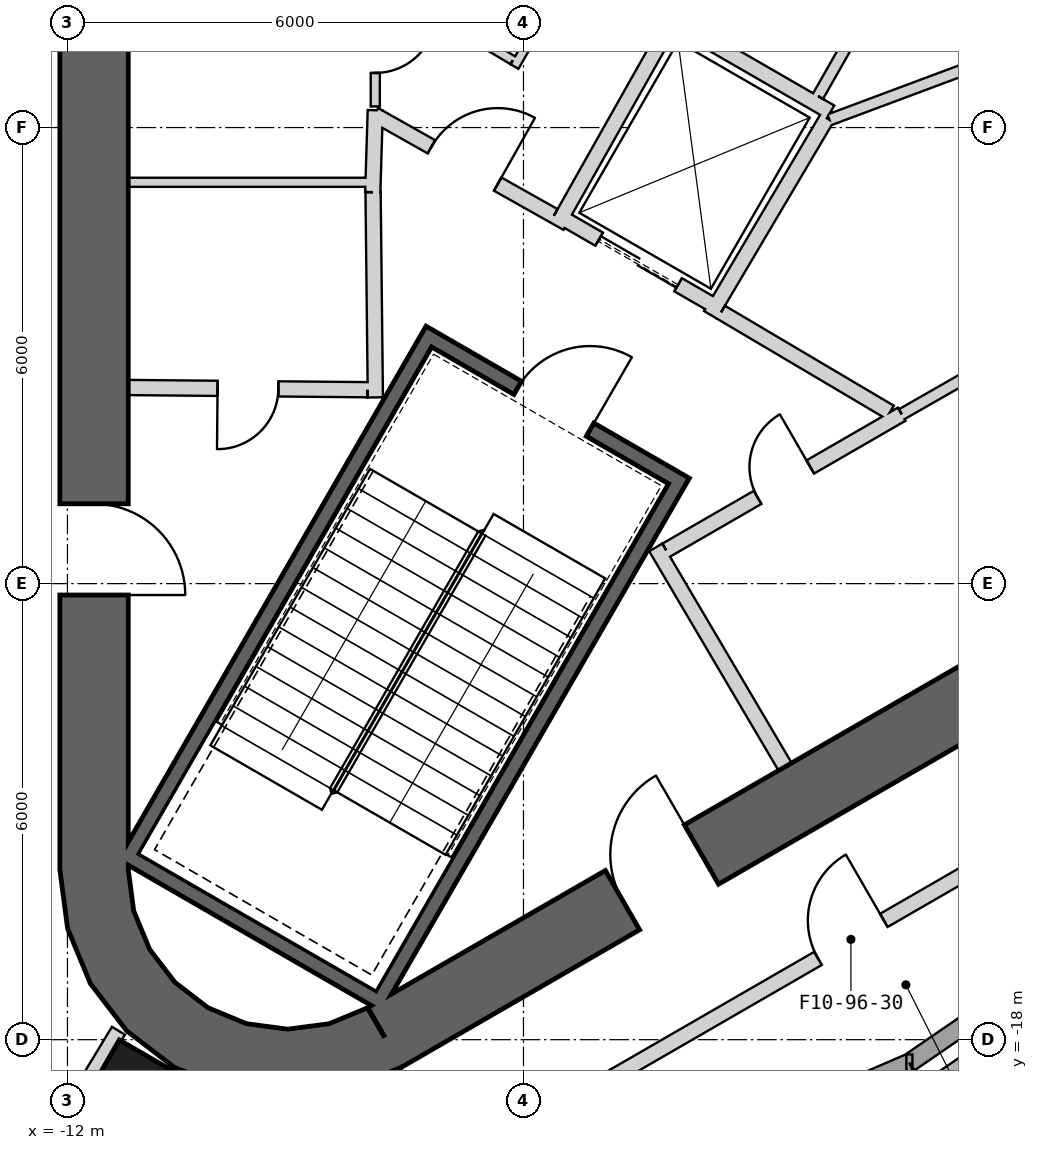
"""IFC4 building model, lengths in metres.
Left out: names, types, materials, properties, quantities, classifications, styles, units other than length and angle.
Written with IfcOpenShell. Run it as: python <this file> out.ifc"""

import sys

from ifc_helpers import new_model, si_unit, direction, frame, frame_2d, origin, origin_2d, place, context, subcontext, project, spatial, polyline, rectangle, outline, extrude, element, fill, save


model = new_model("IFC4")
c1 = context("Model", 3, precision=1e-05, world=origin(), true_north=direction((0.0, 1.0)))
c2 = subcontext(c1, "Body", "Model", "MODEL_VIEW")
j1 = project(units=[si_unit("LENGTHUNIT", "METRE"), si_unit("PLANEANGLEUNIT", "RADIAN")], contexts=[c1])
p1 = place(None, origin())
s1 = spatial("IfcSite", under=j1, at=p1, CompositionType="ELEMENT")
p2 = place(p1, origin())
s2 = spatial("IfcBuilding", under=s1, at=p2, CompositionType="ELEMENT")
p3 = place(p2, frame((0.0, 0.0, 425.3)))
s3 = spatial("IfcBuildingStorey", under=s2, at=p3, CompositionType="ELEMENT", Elevation=425.3)
p4 = place(p3, frame((-11.025, -19.097, -0.25), z_axis=(0.0, 0.0, 1.0), x_axis=(-0.5, -0.866025403784, 0.0)))
e1 = element("IfcColumn", 1, at=p4, inside=s3, PredefinedType="COLUMN", context=c2, shape_type="SweptSolid", body=[
    extrude(rectangle(XDim=1.6, YDim=1.6, at=origin_2d()), origin(), (0.0, 0.0, 1.0), 5.25),
])
p5 = place(p3, frame((-11.65, 15.762, 0.0), z_axis=(0.0, 0.0, 1.0), x_axis=(0.0, -1.0, 0.0)))
e2 = element("IfcWall", 2, at=p5, inside=s3, PredefinedType="SHEAR", context=c2, shape_type="SweptSolid", body=[
    extrude(rectangle(XDim=31.523, YDim=0.9, at=frame_2d((15.762, 0.0))), origin(), (0.0, 0.0, 1.0), 5.0),
])
p6 = place(p5, frame((3.612, 0.0, 0.0)))
e3 = element("IfcOpeningElement", 3, at=p6, cuts=e2, PredefinedType="OPENING", context=c2, shape_type="SweptSolid", body=[
    extrude(rectangle(XDim=1.2, YDim=2.4, at=frame_2d((0.6, 1.2))), frame((0.0, 0.46, 0.0), z_axis=(0.0, -1.0, 0.0), x_axis=(1.0, 0.0, 0.0)), (0.0, 0.0, 1.0), 0.92),
])
p7 = place(p5, frame((26.712, 0.0, 0.0)))
e4 = element("IfcOpeningElement", 4, at=p7, cuts=e2, PredefinedType="OPENING", context=c2, shape_type="SweptSolid", body=[
    extrude(rectangle(XDim=1.2, YDim=2.4, at=frame_2d((0.6, 1.2))), frame((0.0, 0.46, 0.0), z_axis=(0.0, -1.0, 0.0), x_axis=(1.0, 0.0, 0.0)), (0.0, 0.0, 1.0), 0.92),
])
p8 = place(p3, frame((-7.825, -17.97, 0.0), z_axis=(0.0, 0.0, 1.0), x_axis=(0.866028369851, 0.499994862586, 0.0)))
e5 = element("IfcWall", 5, at=p8, inside=s3, PredefinedType="SHEAR", context=c2, shape_type="SweptSolid", body=[
    extrude(rectangle(XDim=31.523, YDim=0.9, at=frame_2d((15.762, 0.0))), origin(), (0.0, 0.0, 1.0), 5.0),
])
p9 = place(p8, frame((17.862, 0.0, 0.0)))
e6 = element("IfcOpeningElement", 6, at=p9, cuts=e5, PredefinedType="OPENING", context=c2, shape_type="SweptSolid", body=[
    extrude(rectangle(XDim=1.2, YDim=2.4, at=frame_2d((0.6, 1.2))), frame((0.0, 0.46, 0.0), z_axis=(0.0, -1.0, 0.0), x_axis=(1.0, 0.0, 0.0)), (0.0, 0.0, 1.0), 0.92),
])
p10 = place(p8, frame((20.562, 0.0, 0.0)))
e7 = element("IfcOpeningElement", 7, at=p10, cuts=e5, PredefinedType="OPENING", context=c2, shape_type="SweptSolid", body=[
    extrude(rectangle(XDim=1.2, YDim=2.4, at=frame_2d((0.6, 1.2))), frame((0.0, 0.46, 0.0), z_axis=(0.0, -1.0, 0.0), x_axis=(1.0, 0.0, 0.0)), (0.0, 0.0, 1.0), 0.92),
])
p11 = place(p8, frame((26.712, 0.0, 0.0)))
e8 = element("IfcOpeningElement", 8, at=p11, cuts=e5, PredefinedType="OPENING", context=c2, shape_type="SweptSolid", body=[
    extrude(rectangle(XDim=1.2, YDim=2.4, at=frame_2d((0.6, 1.2))), frame((0.0, 0.46, 0.0), z_axis=(0.0, -1.0, 0.0), x_axis=(1.0, 0.0, 0.0)), (0.0, 0.0, 1.0), 0.92),
])
p12 = place(p8, frame((3.612, 0.0, 0.0)))
e9 = element("IfcOpeningElement", 9, at=p12, cuts=e5, PredefinedType="OPENING", context=c2, shape_type="SweptSolid", body=[
    extrude(rectangle(XDim=1.2, YDim=2.4, at=frame_2d((0.6, 1.2))), frame((0.0, 0.46, 0.0), z_axis=(0.0, -1.0, 0.0), x_axis=(1.0, 0.0, 0.0)), (0.0, 0.0, 1.0), 0.92),
])
p13 = place(p3, origin())
e10 = element("IfcWall", 10, at=p13, inside=s3, PredefinedType="SHEAR", context=c2, shape_type="SweptSolid", body=[
    extrude(outline(polyline([(-12.1, -15.762), (-11.998, -16.538), (-11.698, -17.262), (-11.221, -17.883), (-10.6, -18.36), (-9.876, -18.659), (-9.1, -18.762), (-8.323, -18.659), (-7.6, -18.36), (-8.05, -17.58), (-8.556, -17.79), (-9.1, -17.862), (-9.644, -17.79), (-10.15, -17.58), (-10.585, -17.247), (-10.919, -16.812), (-11.128, -16.305), (-11.2, -15.762), (-12.1, -15.762)])), origin(), (0.0, 0.0, 1.0), 5.0),
])
p14 = place(p3, frame((-14.612, -16.579, 0.0), z_axis=(0.0, 0.0, 1.0), x_axis=(0.499577110492, -0.866269421527, 0.0)))
e11 = element("IfcWall", 11, at=p14, inside=s3, PredefinedType="SOLIDWALL", context=c2, shape_type="SweptSolid", body=[
    extrude(rectangle(XDim=5.041, YDim=0.24, at=frame_2d((2.521, 0.0))), origin(), (0.0, 0.0, 1.0), 4.75),
])
p15 = place(p3, frame((-7.038, -20.94, 0.0), z_axis=(0.0, 0.0, 1.0), x_axis=(0.918295366669, 0.395895970621, 0.0)))
e12 = element("IfcWall", 12, at=p15, inside=s3, PredefinedType="SOLIDWALL", context=c2, shape_type="SweptSolid", body=[
    extrude(rectangle(XDim=6.66, YDim=0.24, at=frame_2d((3.33, 0.0))), origin(), (0.0, 0.0, 1.0), 4.75),
])
p16 = place(p3, frame((-0.922, -18.304, 0.0), z_axis=(0.0, 0.0, 1.0), x_axis=(0.824481583442, 0.565888786393, 0.0)))
e13 = element("IfcWall", 13, at=p16, inside=s3, PredefinedType="SOLIDWALL", context=c2, shape_type="SweptSolid", body=[
    extrude(rectangle(XDim=19.966, YDim=0.24, at=frame_2d((9.983, 0.0))), origin(), (0.0, 0.0, 1.0), 4.75),
])
p17 = place(p3, frame((16.933, -7.402, 0.04), z_axis=(0.0, 0.0, 1.0), x_axis=(-0.824479303652, -0.565892107958, 0.0)))
e14 = element("IfcWall", 14, at=p17, inside=s3, PredefinedType="PARAPET", context=c2, shape_type="SweptSolid", body=[
    extrude(rectangle(XDim=21.975, YDim=0.25, at=frame_2d((10.987, 0.0))), origin(), (0.0, 0.0, 1.0), 1.2),
])
p18 = place(p3, frame((16.181, -7.25, 0.04), z_axis=(0.0, 0.0, 1.0), x_axis=(-0.824481781464, -0.56588849788, 0.0)))
e15 = element("IfcWall", 15, at=p18, inside=s3, PredefinedType="PARAPET", context=c2, shape_type="SweptSolid", body=[
    extrude(rectangle(XDim=20.799, YDim=0.5, at=frame_2d((10.399, 0.0))), origin(), (0.0, 0.0, 1.0), 0.6),
])
p19 = place(p3, frame((-3.905, -10.563, -0.25), z_axis=(0.0, 0.0, 1.0), x_axis=(-0.500012932018, -0.866017937352, 0.0)))
e16 = element("IfcWall", 16, at=p19, inside=s3, PredefinedType="SHEAR", context=c2, shape_type="SweptSolid", body=[
    extrude(rectangle(XDim=8.1, YDim=0.2, at=frame_2d((4.05, 0.0))), origin(), (0.0, 0.0, 1.0), 5.0),
])
p20 = place(p3, frame((-11.282, -15.541, -0.25), z_axis=(0.0, 0.0, 1.0), x_axis=(0.866000483506, -0.500043160704, 0.0)))
e17 = element("IfcWall", 17, at=p20, inside=s3, PredefinedType="SHEAR", context=c2, shape_type="SweptSolid", body=[
    extrude(rectangle(XDim=3.8, YDim=0.2, at=frame_2d((1.9, 0.0))), origin(), (0.0, 0.0, 1.0), 5.0),
])
p21 = place(p3, frame((-7.196, -8.663, -0.25), z_axis=(0.0, 0.0, 1.0), x_axis=(-0.499997992926, -0.866026562566, 0.0)))
e18 = element("IfcWall", 18, at=p21, inside=s3, PredefinedType="SHEAR", context=c2, shape_type="SweptSolid", body=[
    extrude(rectangle(XDim=7.9, YDim=0.2, at=frame_2d((3.95, 0.0))), origin(), (0.0, 0.0, 1.0), 5.0),
])
p22 = place(p3, frame((-4.041, -10.599, -0.25), z_axis=(0.0, 0.0, 1.0), x_axis=(-0.866047807691, 0.499961193289, 0.0)))
e19 = element("IfcWall", 19, at=p22, inside=s3, PredefinedType="SHEAR", context=c2, shape_type="SweptSolid", body=[
    extrude(rectangle(XDim=3.6, YDim=0.2, at=frame_2d((1.8, 0.0))), origin(), (0.0, 0.0, 1.0), 5.0),
])
p23 = place(p22, frame((1.25, 0.0, 0.25)))
e20 = element("IfcOpeningElement", 20, at=p23, cuts=e19, PredefinedType="OPENING", context=c2, shape_type="SweptSolid", body=[
    extrude(rectangle(XDim=1.1, YDim=2.1, at=frame_2d((0.55, 1.05))), frame((0.0, 0.11, 0.0), z_axis=(0.0, -1.0, 0.0), x_axis=(1.0, 0.0, 0.0)), (0.0, 0.0, 1.0), 0.22),
])
p24 = place(p3, frame((-3.446, -8.368, 0.0), z_axis=(0.0, 0.0, 1.0), x_axis=(-0.866024647952, 0.500001309137, 0.0)))
e21 = element("IfcWall", 21, at=p24, inside=s3, PredefinedType="PLUMBINGWALL", context=c2, shape_type="SweptSolid", body=[
    extrude(rectangle(XDim=2.4, YDim=0.2, at=frame_2d((1.2, 0.0))), origin(), (0.0, 0.0, 1.0), 4.75),
])
p25 = place(p24, frame((0.6, 0.0, 0.0)))
e22 = element("IfcOpeningElement", 22, at=p25, cuts=e21, PredefinedType="OPENING", context=c2, shape_type="SweptSolid", body=[
    extrude(rectangle(XDim=1.2, YDim=2.4, at=frame_2d((0.6, 1.2))), frame((0.0, 0.11, 0.0), z_axis=(0.0, -1.0, 0.0), x_axis=(1.0, 0.0, 0.0)), (0.0, 0.0, 1.0), 0.22),
])
p26 = place(p3, frame((-3.953, -4.646, 0.0), z_axis=(0.0, 0.0, 1.0), x_axis=(0.866053019151, -0.499952165731, 0.0)))
e23 = element("IfcWall", 23, at=p26, inside=s3, PredefinedType="PLUMBINGWALL", context=c2, shape_type="SweptSolid", body=[
    extrude(rectangle(XDim=2.3, YDim=0.2, at=frame_2d((1.15, 0.0))), origin(), (0.0, 0.0, 1.0), 4.75),
])
p27 = place(p3, frame((-2.008, -5.878, 0.0), z_axis=(0.0, 0.0, 1.0), x_axis=(-0.508893526607, -0.860829471253, 0.0)))
e24 = element("IfcWall", 24, at=p27, inside=s3, PredefinedType="PLUMBINGWALL", context=c2, shape_type="SweptSolid", body=[
    extrude(rectangle(XDim=3.005, YDim=0.2, at=frame_2d((1.502, 0.0))), origin(), (0.0, 0.0, 1.0), 4.75),
])
p28 = place(p3, frame((-3.99, -4.509, 0.0), z_axis=(0.0, 0.0, 1.0), x_axis=(-0.491358283181, -0.870957540612, 0.0)))
e25 = element("IfcWall", 25, at=p28, inside=s3, PredefinedType="PLUMBINGWALL", context=c2, shape_type="SweptSolid", body=[
    extrude(rectangle(XDim=3.2, YDim=0.2, at=frame_2d((1.6, 0.0))), origin(), (0.0, 0.0, 1.0), 4.75),
])
p29 = place(p3, frame((-7.95, -5.722, 0.0), z_axis=(0.0, 0.0, 1.0), x_axis=(0.0, 1.0, 0.0)))
e26 = element("IfcWall", 26, at=p29, inside=s3, PredefinedType="PARTITIONING", context=c2, shape_type="SweptSolid", body=[
    extrude(rectangle(XDim=1.702, YDim=0.12, at=frame_2d((0.851, 0.0))), origin(), (0.0, 0.0, 1.0), 4.75),
])
p30 = place(p29, frame((0.441, 0.0, 0.0)))
e27 = element("IfcOpeningElement", 27, at=p30, cuts=e26, PredefinedType="OPENING", context=c2, shape_type="SweptSolid", body=[
    extrude(rectangle(XDim=0.8, YDim=2.1, at=frame_2d((0.4, 1.05))), frame((0.0, 0.07, 0.0), z_axis=(0.0, -1.0, 0.0), x_axis=(1.0, 0.0, 0.0)), (0.0, 0.0, 1.0), 0.14),
])
p31 = place(p3, frame((-11.2, -6.72, 0.0), z_axis=(0.0, 0.0, 1.0), x_axis=(1.0, 0.0, 0.0)))
e28 = element("IfcWall", 28, at=p31, inside=s3, PredefinedType="PARTITIONING", context=c2, shape_type="SweptSolid", body=[
    extrude(rectangle(XDim=3.25, YDim=0.12, at=frame_2d((1.625, 0.0))), origin(), (0.0, 0.0, 1.0), 4.75),
])
p32 = place(p3, frame((-7.983, -6.85, 0.0), z_axis=(0.0, 0.0, 1.0), x_axis=(0.030803413295, 0.999525462272, 0.0)))
e29 = element("IfcWall", 29, at=p32, inside=s3, PredefinedType="PARTITIONING", context=c2, shape_type="SweptSolid", body=[
    extrude(rectangle(XDim=1.078, YDim=0.2, at=frame_2d((0.539, 0.0))), origin(), (0.0, 0.0, 1.0), 4.75),
])
p33 = place(p3, frame((-7.949, -9.55, 0.0), z_axis=(0.0, 0.0, 1.0), x_axis=(-0.011121475088, 0.999938154483, 0.0)))
e30 = element("IfcWall", 30, at=p33, inside=s3, PredefinedType="PARTITIONING", context=c2, shape_type="SweptSolid", body=[
    extrude(rectangle(XDim=2.7, YDim=0.2, at=frame_2d((1.35, 0.0))), origin(), (0.0, 0.0, 1.0), 4.75),
])
p34 = place(p3, frame((-11.2, -9.42, 0.0), z_axis=(0.0, 0.0, 1.0), x_axis=(0.999957467379, -0.009222983926, 0.0)))
e31 = element("IfcWall", 31, at=p34, inside=s3, PredefinedType="PARTITIONING", context=c2, shape_type="SweptSolid", body=[
    extrude(rectangle(XDim=3.15, YDim=0.2, at=frame_2d((1.575, 0.0))), origin(), (0.0, 0.0, 1.0), 4.75),
])
p35 = place(p34, frame((1.175, 0.0, 0.0)))
e32 = element("IfcOpeningElement", 32, at=p35, cuts=e31, PredefinedType="OPENING", context=c2, shape_type="SweptSolid", body=[
    extrude(rectangle(XDim=0.8, YDim=2.1, at=frame_2d((0.4, 1.05))), frame((0.0, 0.11, 0.0), z_axis=(0.0, -1.0, 0.0), x_axis=(1.0, 0.0, 0.0)), (0.0, 0.0, 1.0), 0.22),
])
p36 = place(p3, frame((-4.26, -11.524, 0.0), z_axis=(0.0, 0.0, 1.0), x_axis=(0.507997497166, -0.861358544901, 0.0)))
e33 = element("IfcWall", 33, at=p36, inside=s3, PredefinedType="PARTITIONING", context=c2, shape_type="SweptSolid", body=[
    extrude(rectangle(XDim=3.35, YDim=0.2, at=frame_2d((1.675, 0.0))), origin(), (0.0, 0.0, 1.0), 4.75),
])
p37 = place(p3, frame((-1.024, -9.771, 0.0), z_axis=(0.0, 0.0, 1.0), x_axis=(-0.866029903013, -0.499992207027, 0.0)))
e34 = element("IfcWall", 34, at=p37, inside=s3, PredefinedType="PARTITIONING", context=c2, shape_type="SweptSolid", body=[
    extrude(rectangle(XDim=3.578, YDim=0.2, at=frame_2d((1.789, 0.0))), origin(), (0.0, 0.0, 1.0), 4.75),
])
p38 = place(p37, frame((1.389, 0.0, 0.0)))
e35 = element("IfcOpeningElement", 35, at=p38, cuts=e34, PredefinedType="OPENING", context=c2, shape_type="SweptSolid", body=[
    extrude(rectangle(XDim=0.8, YDim=2.1, at=frame_2d((0.4, 1.05))), frame((0.0, 0.11, 0.0), z_axis=(0.0, -1.0, 0.0), x_axis=(1.0, 0.0, 0.0)), (0.0, 0.0, 1.0), 0.22),
])
p39 = place(p3, frame((-1.024, -9.771, 0.0), z_axis=(0.0, 0.0, 1.0), x_axis=(0.868110220015, 0.496371479746, 0.0)))
e36 = element("IfcWall", 36, at=p39, inside=s3, PredefinedType="PLUMBINGWALL", context=c2, shape_type="SweptSolid", body=[
    extrude(rectangle(XDim=7.123, YDim=0.15, at=frame_2d((3.561, 0.0))), origin(), (0.0, 0.0, 1.0), 4.75),
])
p40 = place(p3, frame((-3.401, -8.43, 0.0), z_axis=(0.0, 0.0, 1.0), x_axis=(0.860630814782, -0.509229418482, 0.0)))
e37 = element("IfcWall", 37, at=p40, inside=s3, PredefinedType="PARTITIONING", context=c2, shape_type="SweptSolid", body=[
    extrude(rectangle(XDim=2.582, YDim=0.2, at=frame_2d((1.291, 0.0))), origin(), (0.0, 0.0, 1.0), 4.75),
])
p41 = place(p3, frame((-7.961, -5.831, 0.0), z_axis=(0.0, 0.0, 1.0), x_axis=(0.871337173459, -0.490684756385, 0.0)))
e38 = element("IfcWall", 38, at=p41, inside=s3, PredefinedType="PARTITIONING", context=c2, shape_type="SweptSolid", body=[
    extrude(rectangle(XDim=2.709, YDim=0.2, at=frame_2d((1.354, 0.0))), origin(), (0.0, 0.0, 1.0), 4.75),
])
p42 = place(p41, frame((0.861, 0.0, 0.0)))
e39 = element("IfcOpeningElement", 39, at=p42, cuts=e38, PredefinedType="OPENING", context=c2, shape_type="SweptSolid", body=[
    extrude(rectangle(XDim=1.0, YDim=2.1, at=frame_2d((0.5, 1.05))), frame((0.0, 0.11, 0.0), z_axis=(0.0, -1.0, 0.0), x_axis=(1.0, 0.0, 0.0)), (0.0, 0.0, 1.0), 0.22),
])
p43 = place(p3, frame((6.729, -2.65, 0.0), z_axis=(0.0, 0.0, 1.0), x_axis=(-0.936914282609, -0.349559189613, 0.0)))
e40 = element("IfcWall", 40, at=p43, inside=s3, PredefinedType="PLUMBINGWALL", context=c2, shape_type="SweptSolid", body=[
    extrude(rectangle(XDim=9.291, YDim=0.15, at=frame_2d((4.645, 0.0))), origin(), (0.0, 0.0, 1.0), 4.75),
])
p44 = place(p3, frame((0.02, -1.814, 0.0), z_axis=(0.0, 0.0, 1.0), x_axis=(-0.494047106341, -0.869435136578, 0.0)))
e41 = element("IfcWall", 41, at=p44, inside=s3, PredefinedType="PLUMBINGWALL", context=c2, shape_type="SweptSolid", body=[
    extrude(rectangle(XDim=4.339, YDim=0.15, at=frame_2d((2.17, 0.0))), origin(), (0.0, 0.0, 1.0), 4.75),
])
p45 = place(p44, frame((1.833, 0.0, 0.0)))
e42 = element("IfcOpeningElement", 42, at=p45, cuts=e41, PredefinedType="OPENING", context=c2, shape_type="SweptSolid", body=[
    extrude(rectangle(XDim=0.8, YDim=2.1, at=frame_2d((0.4, 1.05))), frame((0.0, 0.085, 0.0), z_axis=(0.0, -1.0, 0.0), x_axis=(1.0, 0.0, 0.0)), (0.0, 0.0, 1.0), 0.17),
])
p46 = place(p3, frame((-6.118, -5.197, 0.0), z_axis=(0.0, 0.0, 1.0), x_axis=(0.499990139034, 0.866031096941, 0.0)))
e43 = element("IfcWall", 43, at=p46, inside=s3, PredefinedType="PARTITIONING", context=c2, shape_type="SweptSolid", body=[
    extrude(rectangle(XDim=3.0, YDim=0.12, at=frame_2d((1.5, 0.0))), origin(), (0.0, 0.0, 1.0), 4.75),
])
p47 = place(p3, frame((-7.89, -4.077, 0.0), z_axis=(0.0, 0.0, 1.0), x_axis=(0.860118010064, -0.510095097765, 0.0)))
e44 = element("IfcWall", 44, at=p47, inside=s3, PredefinedType="PARTITIONING", context=c2, shape_type="SweptSolid", body=[
    extrude(rectangle(XDim=2.035, YDim=0.12, at=frame_2d((1.017, 0.0))), origin(), (0.0, 0.0, 1.0), 4.75),
])
p48 = place(p3, frame((-12.104, -19.161, 0.0), z_axis=(0.0, 0.0, 1.0), x_axis=(0.518475368733, 0.855092563421, 0.0)))
e45 = element("IfcWall", 45, at=p48, inside=s3, PredefinedType="PARTITIONING", context=c2, shape_type="SweptSolid", body=[
    extrude(rectangle(XDim=1.496, YDim=0.2, at=frame_2d((0.748, 0.0))), origin(), (0.0, 0.0, 1.0), 4.75),
])
p49 = place(p3, frame((-7.234, -19.881, 0.0), z_axis=(0.0, 0.0, 1.0), x_axis=(0.866028703517, 0.499994284652, 0.0)))
e46 = element("IfcWall", 46, at=p49, inside=s3, PredefinedType="PARTITIONING", context=c2, shape_type="SweptSolid", body=[
    extrude(rectangle(XDim=12.75, YDim=0.2, at=frame_2d((6.375, 0.0))), origin(), (0.0, 0.0, 1.0), 4.75),
])
p50 = place(p49, frame((5.9, 0.0, 0.0)))
e47 = element("IfcOpeningElement", 47, at=p50, cuts=e46, PredefinedType="OPENING", context=c2, shape_type="SweptSolid", body=[
    extrude(rectangle(XDim=1.0, YDim=2.1, at=frame_2d((0.5, 1.05))), frame((0.0, 0.11, 0.0), z_axis=(0.0, -1.0, 0.0), x_axis=(1.0, 0.0, 0.0)), (0.0, 0.0, 1.0), 0.22),
])
p51 = place(p23, origin())
e48 = element("IfcDoor", 48, at=p51, inside=s3, OperationType="SINGLE_SWING_LEFT", PredefinedType="USERDEFINED", context=c2, shape_type="SweptSolid", body=[
    extrude(rectangle(XDim=1.1, YDim=2.1, at=frame_2d((0.55, 1.05))), frame((0.0, 0.025, 0.0), z_axis=(0.0, -1.0, 0.0), x_axis=(1.0, 0.0, 0.0)), (0.0, 0.0, 1.0), 0.05),
])
fill(e20, e48)
p52 = place(p42, origin())
e49 = element("IfcDoor", 49, at=p52, inside=s3, OperationType="SINGLE_SWING_RIGHT", PredefinedType="USERDEFINED", context=c2, shape_type="SweptSolid", body=[
    extrude(rectangle(XDim=1.0, YDim=2.1, at=frame_2d((0.5, 1.05))), frame((0.0, 0.025, 0.0), z_axis=(0.0, -1.0, 0.0), x_axis=(1.0, 0.0, 0.0)), (0.0, 0.0, 1.0), 0.05),
])
fill(e39, e49)
p53 = place(p25, origin())
e50 = element("IfcDoor", 50, at=p53, inside=s3, OperationType="SLIDING_TO_LEFT", PredefinedType="USERDEFINED", context=c2, shape_type="SweptSolid", body=[
    extrude(rectangle(XDim=1.2, YDim=2.4, at=frame_2d((0.6, 1.2))), frame((0.0, 0.025, 0.0), z_axis=(0.0, -1.0, 0.0), x_axis=(1.0, 0.0, 0.0)), (0.0, 0.0, 1.0), 0.05),
])
fill(e22, e50)
p54 = place(p30, origin())
e51 = element("IfcDoor", 51, at=p54, inside=s3, OperationType="SINGLE_SWING_RIGHT", PredefinedType="USERDEFINED", context=c2, shape_type="SweptSolid", body=[
    extrude(rectangle(XDim=0.8, YDim=2.1, at=frame_2d((0.4, 1.05))), frame((0.0, 0.025, 0.0), z_axis=(0.0, -1.0, 0.0), x_axis=(1.0, 0.0, 0.0)), (0.0, 0.0, 1.0), 0.05),
])
fill(e27, e51)
p55 = place(p35, origin())
e52 = element("IfcDoor", 52, at=p55, inside=s3, OperationType="SINGLE_SWING_LEFT", PredefinedType="USERDEFINED", context=c2, shape_type="SweptSolid", body=[
    extrude(rectangle(XDim=0.8, YDim=2.1, at=frame_2d((0.4, 1.05))), frame((0.0, 0.025, 0.0), z_axis=(0.0, -1.0, 0.0), x_axis=(1.0, 0.0, 0.0)), (0.0, 0.0, 1.0), 0.05),
])
fill(e32, e52)
p56 = place(p38, origin())
e53 = element("IfcDoor", 53, at=p56, inside=s3, OperationType="SINGLE_SWING_LEFT", PredefinedType="USERDEFINED", context=c2, shape_type="SweptSolid", body=[
    extrude(rectangle(XDim=0.8, YDim=2.1, at=frame_2d((0.4, 1.05))), frame((0.0, 0.025, 0.0), z_axis=(0.0, -1.0, 0.0), x_axis=(1.0, 0.0, 0.0)), (0.0, 0.0, 1.0), 0.05),
])
fill(e35, e53)
p57 = place(p50, origin())
e54 = element("IfcDoor", 54, at=p57, inside=s3, OperationType="SINGLE_SWING_RIGHT", PredefinedType="USERDEFINED", context=c2, shape_type="SweptSolid", body=[
    extrude(rectangle(XDim=1.0, YDim=2.1, at=frame_2d((0.5, 1.05))), frame((0.0, 0.025, 0.0), z_axis=(0.0, -1.0, 0.0), x_axis=(1.0, 0.0, 0.0)), (0.0, 0.0, 1.0), 0.05),
])
fill(e47, e54)
p58 = place(p7, origin())
e55 = element("IfcDoor", 55, at=p58, inside=s3, OperationType="SINGLE_SWING_RIGHT", PredefinedType="USERDEFINED", context=c2, shape_type="SweptSolid", body=[
    extrude(rectangle(XDim=1.2, YDim=2.4, at=frame_2d((0.6, 1.2))), frame((0.0, 0.025, 0.0), z_axis=(0.0, -1.0, 0.0), x_axis=(1.0, 0.0, 0.0)), (0.0, 0.0, 1.0), 0.05),
])
fill(e4, e55)
p59 = place(p12, origin())
e56 = element("IfcDoor", 56, at=p59, inside=s3, OperationType="SINGLE_SWING_RIGHT", PredefinedType="USERDEFINED", context=c2, shape_type="SweptSolid", body=[
    extrude(rectangle(XDim=1.2, YDim=2.4, at=frame_2d((0.6, 1.2))), frame((0.0, 0.025, 0.0), z_axis=(0.0, -1.0, 0.0), x_axis=(1.0, 0.0, 0.0)), (0.0, 0.0, 1.0), 0.05),
])
fill(e9, e56)
save(model, sys.argv[1])
